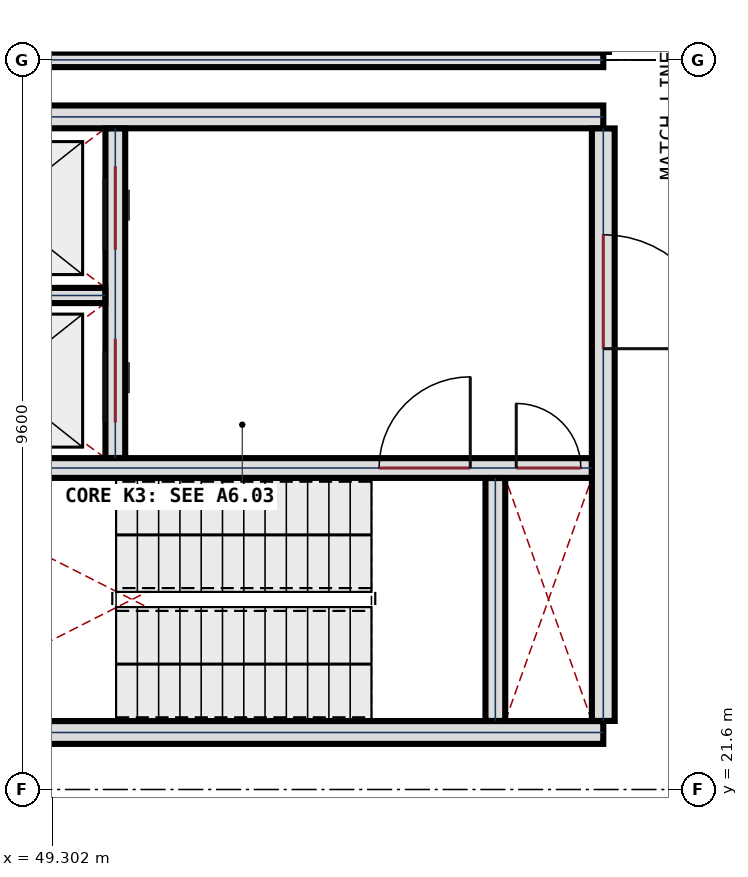
"""IFC4 building model, lengths in metres.
Left out: names, types, materials, properties, quantities, classifications, styles, units other than length and angle.
Written with IfcOpenShell. Run it as: python <this file> out.ifc"""

import sys

from ifc_helpers import new_model, si_unit, direction, frame, frame_2d, origin, place, context, subcontext, project, spatial, rectangle, extrude, element, fill, save


model = new_model("IFC4")
c1 = context("Model", 3, precision=1e-05, world=origin(), true_north=direction((0.0, 1.0)))
c2 = subcontext(c1, "Body", "Model", "MODEL_VIEW")
j1 = project(units=[si_unit("LENGTHUNIT", "METRE"), si_unit("PLANEANGLEUNIT", "RADIAN")], contexts=[c1])
p1 = place(None, origin())
s1 = spatial("IfcSite", under=j1, at=p1, CompositionType="ELEMENT")
p2 = place(p1, origin())
s2 = spatial("IfcBuilding", under=s1, at=p2, CompositionType="ELEMENT")
p3 = place(p2, frame((0.0, 0.0, 9.9)))
s3 = spatial("IfcBuildingStorey", under=s2, at=p3, CompositionType="ELEMENT", Elevation=9.9)
for number, where, z_axis, x_axis in (
    (1, (56.55, 22.35, 0.0), (0.0, 0.0, 1.0), (-1.0, 0.0, 0.0)),
    (2, (47.05, 30.45, 0.0), (0.0, 0.0, 1.0), (1.0, 0.0, 0.0)),
):
    element("IfcWall", number, at=place(p3, frame(where, z_axis=z_axis, x_axis=x_axis)), inside=s3, PredefinedType="SHEAR", context=c2, shape_type="SweptSolid", body=[
        extrude(rectangle(XDim=9.5, YDim=0.3, at=frame_2d((4.75, 0.0))), origin(), (0.0, 0.0, 1.0), 4.5),
    ])
p4 = place(p3, frame((56.55, 30.298, 0.0), z_axis=(0.0, 0.0, 1.0), x_axis=(0.0, -1.0, 0.0)))
e3 = element("IfcWall", 3, at=p4, inside=s3, PredefinedType="SHEAR", context=c2, shape_type="SweptSolid", body=[
    extrude(rectangle(XDim=7.796, YDim=0.3, at=frame_2d((3.898, 0.0))), origin(), (0.0, 0.0, 1.0), 4.5),
])
p5 = place(p4, frame((1.398, 0.0, 0.0)))
e4 = element("IfcOpeningElement", 4, at=p5, cuts=e3, PredefinedType="OPENING", context=c2, shape_type="SweptSolid", body=[
    extrude(rectangle(XDim=1.5, YDim=2.25, at=frame_2d((0.75, 1.125))), frame((0.0, 0.16, 0.0), z_axis=(0.0, -1.0, 0.0), x_axis=(1.0, 0.0, 0.0)), (0.0, 0.0, 1.0), 0.32),
])
p6 = place(p3, frame((47.202, 25.83, 0.0), z_axis=(0.0, 0.0, 1.0), x_axis=(1.0, 0.0, 0.0)))
e5 = element("IfcWall", 5, at=p6, inside=s3, PredefinedType="SHEAR", context=c2, shape_type="SweptSolid", body=[
    extrude(rectangle(XDim=9.196, YDim=0.26, at=frame_2d((4.598, 0.0))), origin(), (0.0, 0.0, 1.0), 4.5),
])
p7 = place(p6, frame((6.398, 0.0, 0.0)))
e6 = element("IfcOpeningElement", 6, at=p7, cuts=e5, PredefinedType="OPENING", context=c2, shape_type="SweptSolid", body=[
    extrude(rectangle(XDim=1.2, YDim=2.2, at=frame_2d((0.6, 1.1))), frame((0.0, 0.14, 0.0), z_axis=(0.0, -1.0, 0.0), x_axis=(1.0, 0.0, 0.0)), (0.0, 0.0, 1.0), 0.28),
])
p8 = place(p6, frame((8.203, 0.0, 0.0)))
e7 = element("IfcOpeningElement", 7, at=p8, cuts=e5, PredefinedType="OPENING", context=c2, shape_type="SweptSolid", body=[
    extrude(rectangle(XDim=0.85, YDim=2.05, at=frame_2d((0.425, 1.025))), frame((0.0, 0.14, 0.0), z_axis=(0.0, -1.0, 0.0), x_axis=(1.0, 0.0, 0.0)), (0.0, 0.0, 1.0), 0.28),
])
p9 = place(p3, frame((55.13, 22.502, 0.0), z_axis=(0.0, 0.0, 1.0), x_axis=(0.0, 1.0, 0.0)))
e8 = element("IfcWall", 8, at=p9, inside=s3, PredefinedType="SHEAR", context=c2, shape_type="SweptSolid", body=[
    extrude(rectangle(XDim=3.196, YDim=0.26, at=frame_2d((1.598, 0.0))), origin(), (0.0, 0.0, 1.0), 4.5),
])
p10 = place(p3, frame((50.13, 25.962, 0.0), z_axis=(0.0, 0.0, 1.0), x_axis=(0.0, 1.0, 0.0)))
e9 = element("IfcWall", 9, at=p10, inside=s3, PredefinedType="SHEAR", context=c2, shape_type="SweptSolid", body=[
    extrude(rectangle(XDim=4.336, YDim=0.26, at=frame_2d((2.168, 0.0))), origin(), (0.0, 0.0, 1.0), 4.5),
])
p11 = place(p10, frame((0.468, 0.0, 0.0)))
e10 = element("IfcOpeningElement", 10, at=p11, cuts=e9, PredefinedType="OPENING", context=c2, shape_type="SweptSolid", body=[
    extrude(rectangle(XDim=1.1, YDim=2.15, at=frame_2d((0.55, 1.075))), frame((0.0, 0.14, 0.0), z_axis=(0.0, -1.0, 0.0), x_axis=(1.0, 0.0, 0.0)), (0.0, 0.0, 1.0), 0.28),
])
p12 = place(p10, frame((2.738, 0.0, 0.0)))
e11 = element("IfcOpeningElement", 11, at=p12, cuts=e9, PredefinedType="OPENING", context=c2, shape_type="SweptSolid", body=[
    extrude(rectangle(XDim=1.1, YDim=2.15, at=frame_2d((0.55, 1.075))), frame((0.0, 0.14, 0.0), z_axis=(0.0, -1.0, 0.0), x_axis=(1.0, 0.0, 0.0)), (0.0, 0.0, 1.0), 0.28),
])
p13 = place(p3, frame((47.202, 28.1, 0.0), z_axis=(0.0, 0.0, 1.0), x_axis=(1.0, 0.0, 0.0)))
e12 = element("IfcWall", 12, at=p13, inside=s3, PredefinedType="PLUMBINGWALL", context=c2, shape_type="SweptSolid", body=[
    extrude(rectangle(XDim=2.796, YDim=0.2, at=frame_2d((1.398, 0.0))), origin(), (0.0, 0.0, 1.0), 4.16),
])
p14 = place(p3, frame((46.453, 31.2, 0.0), z_axis=(0.0, 0.0, 1.0), x_axis=(1.0, 0.0, 0.0)))
e13 = element("IfcWall", 13, at=p14, inside=s3, PredefinedType="PARTITIONING", context=c2, shape_type="SweptSolid", body=[
    extrude(rectangle(XDim=10.097, YDim=0.19, at=frame_2d((5.049, 0.0))), origin(), (0.0, 0.0, 1.0), 3.15),
])
p15 = place(p5, origin())
e14 = element("IfcDoor", 14, at=p15, inside=s3, OperationType="SINGLE_SWING_RIGHT", PredefinedType="DOOR", context=c2, shape_type="SweptSolid", body=[
    extrude(rectangle(XDim=1.5, YDim=2.25, at=frame_2d((0.75, 1.125))), frame((0.0, 0.032, 0.0), z_axis=(0.0, -1.0, 0.0), x_axis=(1.0, 0.0, 0.0)), (0.0, 0.0, 1.0), 0.065),
])
fill(e4, e14)
p16 = place(p7, origin())
e15 = element("IfcDoor", 15, at=p16, inside=s3, OperationType="SINGLE_SWING_RIGHT", PredefinedType="DOOR", context=c2, shape_type="SweptSolid", body=[
    extrude(rectangle(XDim=1.2, YDim=2.2, at=frame_2d((0.6, 1.1))), frame((0.0, 0.032, 0.0), z_axis=(0.0, -1.0, 0.0), x_axis=(1.0, 0.0, 0.0)), (0.0, 0.0, 1.0), 0.065),
])
fill(e6, e15)
p17 = place(p8, origin())
e16 = element("IfcDoor", 16, at=p17, inside=s3, OperationType="SINGLE_SWING_LEFT", PredefinedType="DOOR", context=c2, shape_type="SweptSolid", body=[
    extrude(rectangle(XDim=0.85, YDim=2.05, at=frame_2d((0.425, 1.025))), frame((0.0, 0.032, 0.0), z_axis=(0.0, -1.0, 0.0), x_axis=(1.0, 0.0, 0.0)), (0.0, 0.0, 1.0), 0.065),
])
fill(e7, e16)
p18 = place(p11, origin())
e17 = element("IfcDoor", 17, at=p18, inside=s3, OperationType="SLIDING_TO_LEFT", PredefinedType="DOOR", context=c2, shape_type="SweptSolid", body=[
    extrude(rectangle(XDim=1.1, YDim=2.15, at=frame_2d((0.55, 1.075))), frame((0.0, 0.032, 0.0), z_axis=(0.0, -1.0, 0.0), x_axis=(1.0, 0.0, 0.0)), (0.0, 0.0, 1.0), 0.065),
])
fill(e10, e17)
p19 = place(p12, origin())
e18 = element("IfcDoor", 18, at=p19, inside=s3, OperationType="SLIDING_TO_LEFT", PredefinedType="DOOR", context=c2, shape_type="SweptSolid", body=[
    extrude(rectangle(XDim=1.1, YDim=2.15, at=frame_2d((0.55, 1.075))), frame((0.0, 0.032, 0.0), z_axis=(0.0, -1.0, 0.0), x_axis=(1.0, 0.0, 0.0)), (0.0, 0.0, 1.0), 0.065),
])
fill(e11, e18)
save(model, sys.argv[1])
